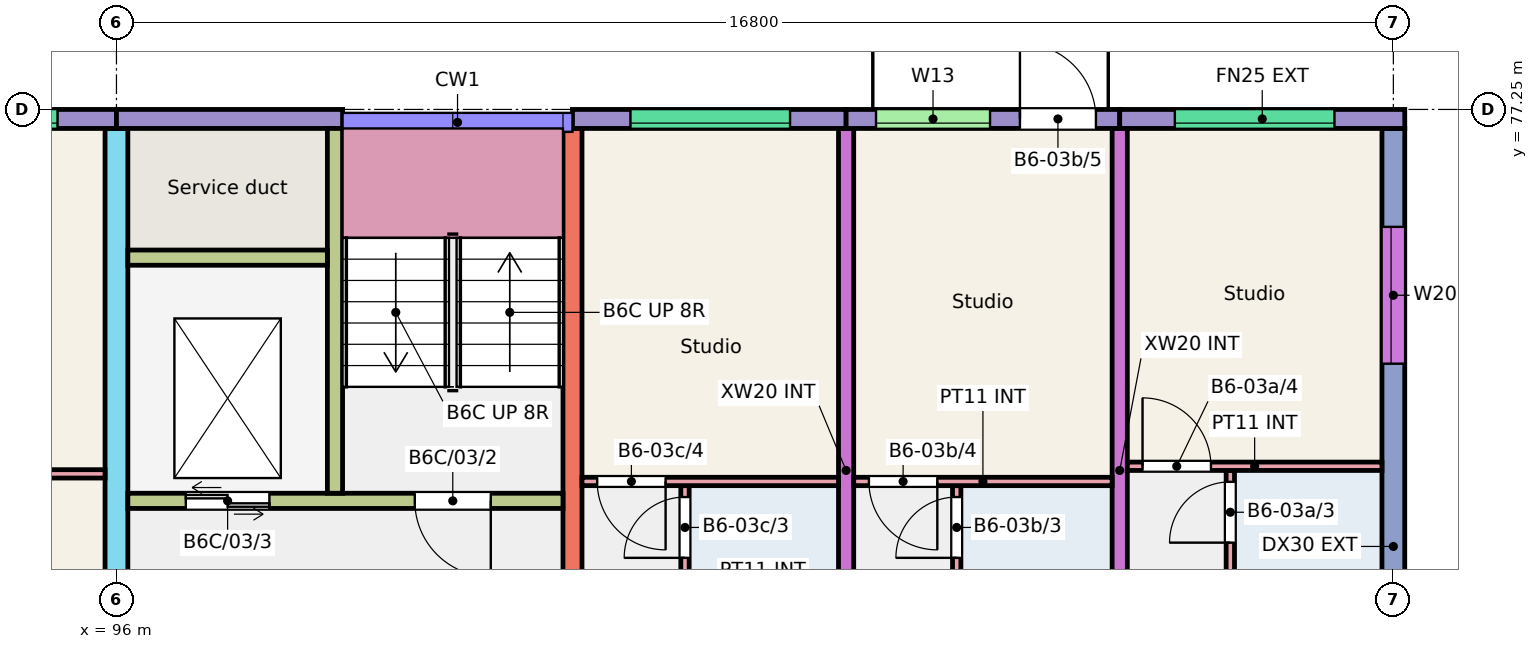
"""IFC4 building model, lengths in metres.
Left out: names, types, materials, properties, quantities, classifications, styles, units other than length and angle.
Written with IfcOpenShell. Run it as: python <this file> out.ifc"""

import sys

from ifc_helpers import new_model, si_unit, direction, frame, frame_2d, origin, place, context, subcontext, project, spatial, rectangle, extrude, element, fill, save


model = new_model("IFC4")
c1 = context("Model", 3, precision=1e-05, world=origin(), true_north=direction((0.0, 1.0)))
c2 = subcontext(c1, "Body", "Model", "MODEL_VIEW")
j1 = project(units=[si_unit("LENGTHUNIT", "METRE"), si_unit("PLANEANGLEUNIT", "RADIAN")], contexts=[c1])
p1 = place(None, origin())
s1 = spatial("IfcSite", under=j1, at=p1, CompositionType="ELEMENT")
p2 = place(p1, origin())
s2 = spatial("IfcBuilding", under=s1, at=p2, CompositionType="ELEMENT")
p3 = place(p2, frame((0.0, 0.0, 9.0)))
s3 = spatial("IfcBuildingStorey", under=s2, at=p3, CompositionType="ELEMENT", Elevation=9.0)
p4 = place(p3, frame((96.0, 66.0, 0.0), z_axis=(0.0, 0.0, 1.0), x_axis=(0.0, 1.0, 0.0)))
e1 = element("IfcWall", 1, at=p4, inside=s3, PredefinedType="SHEAR", context=c2, shape_type="SweptSolid", body=[
    extrude(rectangle(XDim=11.0, YDim=0.3, at=frame_2d((5.5, 0.0))), origin(), (0.0, 0.0, 1.0), 3.0),
])
p5 = place(p4, frame((0.3, 0.0, 0.0)))
e2 = element("IfcOpeningElement", 2, at=p5, cuts=e1, PredefinedType="OPENING", context=c2, shape_type="SweptSolid", body=[
    extrude(rectangle(XDim=1.2, YDim=2.1, at=frame_2d((0.6, 1.05))), frame((0.0, 0.16, 0.0), z_axis=(0.0, -1.0, 0.0), x_axis=(1.0, 0.0, 0.0)), (0.0, 0.0, 1.0), 0.32),
])
p6 = place(p3, frame((102.0, 68.0, 0.0), z_axis=(0.0, 0.0, 1.0), x_axis=(0.0, 1.0, 0.0)))
e3 = element("IfcWall", 3, at=p6, inside=s3, PredefinedType="SHEAR", context=c2, shape_type="SweptSolid", body=[
    extrude(rectangle(XDim=9.0, YDim=0.25, at=frame_2d((4.5, 0.0))), origin(), (0.0, 0.0, 1.0), 3.0),
])
for number, where, z_axis, x_axis in (
    (4, (105.6, 68.0, 0.0), (0.0, 0.0, 1.0), (0.0, 1.0, 0.0)),
    (5, (109.2, 68.0, 0.0), (0.0, 0.0, 1.0), (0.0, 1.0, 0.0)),
):
    element("IfcWall", number, at=place(p3, frame(where, z_axis=z_axis, x_axis=x_axis)), inside=s3, PredefinedType="SHEAR", context=c2, shape_type="SweptSolid", body=[
        extrude(rectangle(XDim=9.0, YDim=0.2, at=frame_2d((4.5, 0.0))), origin(), (0.0, 0.0, 1.0), 3.0),
    ])
p7 = place(p3, frame((112.8, 66.0, 0.0), z_axis=(0.0, 0.0, 1.0), x_axis=(0.0, 1.0, 0.0)))
e6 = element("IfcWall", 6, at=p7, inside=s3, PredefinedType="SHEAR", context=c2, shape_type="SweptSolid", body=[
    extrude(rectangle(XDim=11.0, YDim=0.3, at=frame_2d((5.5, 0.0))), origin(), (0.0, 0.0, 1.0), 3.0),
])
p8 = place(p7, frame((2.6, 0.0, 0.9)))
e7 = element("IfcOpeningElement", 7, at=p8, cuts=e6, PredefinedType="OPENING", context=c2, shape_type="SweptSolid", body=[
    extrude(rectangle(XDim=1.2, YDim=1.5, at=frame_2d((0.6, 0.75))), frame((0.0, 0.16, 0.0), z_axis=(0.0, -1.0, 0.0), x_axis=(1.0, 0.0, 0.0)), (0.0, 0.0, 1.0), 0.32),
])
p9 = place(p7, frame((7.905, 0.0, 0.9)))
e8 = element("IfcOpeningElement", 8, at=p9, cuts=e6, PredefinedType="OPENING", context=c2, shape_type="SweptSolid", body=[
    extrude(rectangle(XDim=1.8, YDim=1.5, at=frame_2d((0.9, 0.75))), frame((0.0, 0.16, 0.0), z_axis=(0.0, -1.0, 0.0), x_axis=(1.0, 0.0, 0.0)), (0.0, 0.0, 1.0), 0.32),
])
p10 = place(p3, frame((92.4, 77.125, 0.0), z_axis=(0.0, 0.0, 1.0), x_axis=(1.0, 0.0, 0.0)))
e9 = element("IfcWall", 9, at=p10, inside=s3, PredefinedType="SOLIDWALL", context=c2, shape_type="SweptSolid", body=[
    extrude(rectangle(XDim=3.6, YDim=0.25, at=frame_2d((1.8, 0.0))), origin(), (0.0, 0.0, 1.0), 3.0),
])
p11 = place(p10, frame((0.725, 0.0, 1.2)))
e10 = element("IfcOpeningElement", 10, at=p11, cuts=e9, PredefinedType="OPENING", context=c2, shape_type="SweptSolid", body=[
    extrude(rectangle(XDim=2.1, YDim=1.2, at=frame_2d((1.05, 0.6))), frame((0.0, 0.135, 0.0), z_axis=(0.0, -1.0, 0.0), x_axis=(1.0, 0.0, 0.0)), (0.0, 0.0, 1.0), 0.27),
])
p12 = place(p3, frame((96.0, 77.125, 0.0), z_axis=(0.0, 0.0, 1.0), x_axis=(1.0, 0.0, 0.0)))
e11 = element("IfcWall", 11, at=p12, inside=s3, PredefinedType="SOLIDWALL", context=c2, shape_type="SweptSolid", body=[
    extrude(rectangle(XDim=2.975, YDim=0.25, at=frame_2d((1.488, 0.0))), origin(), (0.0, 0.0, 1.0), 3.0),
])
p13 = place(p3, frame((96.15, 72.1, 0.0), z_axis=(0.0, 0.0, 1.0), x_axis=(1.0, 0.0, 0.0)))
e12 = element("IfcWall", 12, at=p13, inside=s3, PredefinedType="SHEAR", context=c2, shape_type="SweptSolid", body=[
    extrude(rectangle(XDim=5.725, YDim=0.2, at=frame_2d((2.863, 0.0))), origin(), (0.0, 0.0, 1.0), 3.0),
])
p14 = place(p13, frame((3.775, 0.0, 0.0)))
e13 = element("IfcOpeningElement", 13, at=p14, cuts=e12, PredefinedType="OPENING", context=c2, shape_type="SweptSolid", body=[
    extrude(rectangle(XDim=1.0, YDim=2.1, at=frame_2d((0.5, 1.05))), frame((0.0, 0.11, 0.0), z_axis=(0.0, -1.0, 0.0), x_axis=(1.0, 0.0, 0.0)), (0.0, 0.0, 1.0), 0.22),
])
p15 = place(p13, frame((0.762, 0.0, 0.0)))
e14 = element("IfcOpeningElement", 14, at=p15, cuts=e12, PredefinedType="OPENING", context=c2, shape_type="SweptSolid", body=[
    extrude(rectangle(XDim=1.1, YDim=2.1, at=frame_2d((0.55, 1.05))), frame((0.0, 0.11, 0.0), z_axis=(0.0, -1.0, 0.0), x_axis=(1.0, 0.0, 0.0)), (0.0, 0.0, 1.0), 0.22),
])
p16 = place(p3, frame((98.875, 72.2, 0.0), z_axis=(0.0, 0.0, 1.0), x_axis=(0.0, 1.0, 0.0)))
e15 = element("IfcWall", 15, at=p16, inside=s3, PredefinedType="SHEAR", context=c2, shape_type="SweptSolid", body=[
    extrude(rectangle(XDim=4.8, YDim=0.2, at=frame_2d((2.4, 0.0))), origin(), (0.0, 0.0, 1.0), 3.0),
])
p17 = place(p3, frame((96.15, 75.3, 0.0), z_axis=(0.0, 0.0, 1.0), x_axis=(1.0, 0.0, 0.0)))
e16 = element("IfcWall", 16, at=p17, inside=s3, PredefinedType="SHEAR", context=c2, shape_type="SweptSolid", body=[
    extrude(rectangle(XDim=2.625, YDim=0.2, at=frame_2d((1.312, 0.0))), origin(), (0.0, 0.0, 1.0), 3.0),
])
p18 = place(p3, frame((102.0, 77.125, 0.0), z_axis=(0.0, 0.0, 1.0), x_axis=(1.0, 0.0, 0.0)))
e17 = element("IfcWall", 17, at=p18, inside=s3, PredefinedType="SOLIDWALL", context=c2, shape_type="SweptSolid", body=[
    extrude(rectangle(XDim=3.6, YDim=0.25, at=frame_2d((1.8, 0.0))), origin(), (0.0, 0.0, 1.0), 3.0),
])
p19 = place(p18, frame((0.762, 0.0, 1.2)))
e18 = element("IfcOpeningElement", 18, at=p19, cuts=e17, PredefinedType="OPENING", context=c2, shape_type="SweptSolid", body=[
    extrude(rectangle(XDim=2.1, YDim=1.2, at=frame_2d((1.05, 0.6))), frame((0.0, 0.135, 0.0), z_axis=(0.0, -1.0, 0.0), x_axis=(1.0, 0.0, 0.0)), (0.0, 0.0, 1.0), 0.27),
])
p20 = place(p3, frame((105.6, 77.125, 0.0), z_axis=(0.0, 0.0, 1.0), x_axis=(1.0, 0.0, 0.0)))
e19 = element("IfcWall", 19, at=p20, inside=s3, PredefinedType="SOLIDWALL", context=c2, shape_type="SweptSolid", body=[
    extrude(rectangle(XDim=3.6, YDim=0.25, at=frame_2d((1.8, 0.0))), origin(), (0.0, 0.0, 1.0), 3.0),
])
p21 = place(p20, frame((0.394, 0.0, 1.2)))
e20 = element("IfcOpeningElement", 20, at=p21, cuts=e19, PredefinedType="OPENING", context=c2, shape_type="SweptSolid", body=[
    extrude(rectangle(XDim=1.5, YDim=1.2, at=frame_2d((0.75, 0.6))), frame((0.0, 0.135, 0.0), z_axis=(0.0, -1.0, 0.0), x_axis=(1.0, 0.0, 0.0)), (0.0, 0.0, 1.0), 0.27),
])
p22 = place(p20, frame((2.287, 0.0, 0.0)))
e21 = element("IfcOpeningElement", 21, at=p22, cuts=e19, PredefinedType="OPENING", context=c2, shape_type="SweptSolid", body=[
    extrude(rectangle(XDim=1.0, YDim=2.1, at=frame_2d((0.5, 1.05))), frame((0.0, 0.135, 0.0), z_axis=(0.0, -1.0, 0.0), x_axis=(1.0, 0.0, 0.0)), (0.0, 0.0, 1.0), 0.27),
])
p23 = place(p3, frame((109.2, 77.125, 0.0), z_axis=(0.0, 0.0, 1.0), x_axis=(1.0, 0.0, 0.0)))
e22 = element("IfcWall", 22, at=p23, inside=s3, PredefinedType="SOLIDWALL", context=c2, shape_type="SweptSolid", body=[
    extrude(rectangle(XDim=3.75, YDim=0.25, at=frame_2d((1.875, 0.0))), origin(), (0.0, 0.0, 1.0), 3.0),
])
p24 = place(p23, frame((0.725, 0.0, 1.2)))
e23 = element("IfcOpeningElement", 23, at=p24, cuts=e22, PredefinedType="OPENING", context=c2, shape_type="SweptSolid", body=[
    extrude(rectangle(XDim=2.1, YDim=1.2, at=frame_2d((1.05, 0.6))), frame((0.0, 0.135, 0.0), z_axis=(0.0, -1.0, 0.0), x_axis=(1.0, 0.0, 0.0)), (0.0, 0.0, 1.0), 0.27),
])
p25 = place(p3, frame((92.5, 72.455, 0.0), z_axis=(0.0, 0.0, 1.0), x_axis=(1.0, 0.0, 0.0)))
e24 = element("IfcWall", 24, at=p25, inside=s3, PredefinedType="PARTITIONING", context=c2, shape_type="SweptSolid", body=[
    extrude(rectangle(XDim=3.35, YDim=0.11, at=frame_2d((1.675, 0.0))), origin(), (0.0, 0.0, 1.0), 2.8),
])
p26 = place(p3, frame((110.655, 68.0, 0.0), z_axis=(0.0, 0.0, 1.0), x_axis=(0.0, 1.0, 0.0)))
e25 = element("IfcWall", 25, at=p26, inside=s3, PredefinedType="PARTITIONING", context=c2, shape_type="SweptSolid", body=[
    extrude(rectangle(XDim=4.5, YDim=0.11, at=frame_2d((2.25, 0.0))), origin(), (0.0, 0.0, 1.0), 2.8),
])
p27 = place(p26, frame((0.2, 0.0, 0.0)))
e26 = element("IfcOpeningElement", 26, at=p27, cuts=e25, PredefinedType="OPENING", context=c2, shape_type="SweptSolid", body=[
    extrude(rectangle(XDim=0.8, YDim=2.1, at=frame_2d((0.4, 1.05))), frame((0.0, 0.065, 0.0), z_axis=(0.0, -1.0, 0.0), x_axis=(1.0, 0.0, 0.0)), (0.0, 0.0, 1.0), 0.13),
])
p28 = place(p26, frame((3.55, 0.0, 0.0)))
e27 = element("IfcOpeningElement", 27, at=p28, cuts=e25, PredefinedType="OPENING", context=c2, shape_type="SweptSolid", body=[
    extrude(rectangle(XDim=0.8, YDim=2.1, at=frame_2d((0.4, 1.05))), frame((0.0, 0.065, 0.0), z_axis=(0.0, -1.0, 0.0), x_axis=(1.0, 0.0, 0.0)), (0.0, 0.0, 1.0), 0.13),
])
p29 = place(p3, frame((109.3, 72.555, 0.0), z_axis=(0.0, 0.0, 1.0), x_axis=(1.0, 0.0, 0.0)))
e28 = element("IfcWall", 28, at=p29, inside=s3, PredefinedType="PARTITIONING", context=c2, shape_type="SweptSolid", body=[
    extrude(rectangle(XDim=3.35, YDim=0.11, at=frame_2d((1.675, 0.0))), origin(), (0.0, 0.0, 1.0), 2.8),
])
p30 = place(p29, frame((0.2, 0.0, 0.0)))
e29 = element("IfcOpeningElement", 29, at=p30, cuts=e28, PredefinedType="OPENING", context=c2, shape_type="SweptSolid", body=[
    extrude(rectangle(XDim=0.9, YDim=2.1, at=frame_2d((0.45, 1.05))), frame((0.0, 0.065, 0.0), z_axis=(0.0, -1.0, 0.0), x_axis=(1.0, 0.0, 0.0)), (0.0, 0.0, 1.0), 0.13),
])
p31 = place(p3, frame((107.055, 68.0, 0.0), z_axis=(0.0, 0.0, 1.0), x_axis=(0.0, 1.0, 0.0)))
e30 = element("IfcWall", 30, at=p31, inside=s3, PredefinedType="PARTITIONING", context=c2, shape_type="SweptSolid", body=[
    extrude(rectangle(XDim=4.3, YDim=0.11, at=frame_2d((2.15, 0.0))), origin(), (0.0, 0.0, 1.0), 2.8),
])
p32 = place(p31, frame((0.2, 0.0, 0.0)))
e31 = element("IfcOpeningElement", 31, at=p32, cuts=e30, PredefinedType="OPENING", context=c2, shape_type="SweptSolid", body=[
    extrude(rectangle(XDim=0.8, YDim=2.1, at=frame_2d((0.4, 1.05))), frame((0.0, 0.065, 0.0), z_axis=(0.0, -1.0, 0.0), x_axis=(1.0, 0.0, 0.0)), (0.0, 0.0, 1.0), 0.13),
])
p33 = place(p31, frame((3.35, 0.0, 0.0)))
e32 = element("IfcOpeningElement", 32, at=p33, cuts=e30, PredefinedType="OPENING", context=c2, shape_type="SweptSolid", body=[
    extrude(rectangle(XDim=0.8, YDim=2.1, at=frame_2d((0.4, 1.05))), frame((0.0, 0.065, 0.0), z_axis=(0.0, -1.0, 0.0), x_axis=(1.0, 0.0, 0.0)), (0.0, 0.0, 1.0), 0.13),
])
p34 = place(p3, frame((105.7, 72.355, 0.0), z_axis=(0.0, 0.0, 1.0), x_axis=(1.0, 0.0, 0.0)))
e33 = element("IfcWall", 33, at=p34, inside=s3, PredefinedType="PARTITIONING", context=c2, shape_type="SweptSolid", body=[
    extrude(rectangle(XDim=3.4, YDim=0.11, at=frame_2d((1.7, 0.0))), origin(), (0.0, 0.0, 1.0), 2.8),
])
p35 = place(p34, frame((0.2, 0.0, 0.0)))
e34 = element("IfcOpeningElement", 34, at=p35, cuts=e33, PredefinedType="OPENING", context=c2, shape_type="SweptSolid", body=[
    extrude(rectangle(XDim=0.9, YDim=2.1, at=frame_2d((0.45, 1.05))), frame((0.0, 0.065, 0.0), z_axis=(0.0, -1.0, 0.0), x_axis=(1.0, 0.0, 0.0)), (0.0, 0.0, 1.0), 0.13),
])
p36 = place(p3, frame((103.48, 68.0, 0.0), z_axis=(0.0, 0.0, 1.0), x_axis=(0.0, 1.0, 0.0)))
e35 = element("IfcWall", 35, at=p36, inside=s3, PredefinedType="PARTITIONING", context=c2, shape_type="SweptSolid", body=[
    extrude(rectangle(XDim=4.3, YDim=0.11, at=frame_2d((2.15, 0.0))), origin(), (0.0, 0.0, 1.0), 2.8),
])
p37 = place(p36, frame((0.2, 0.0, 0.0)))
e36 = element("IfcOpeningElement", 36, at=p37, cuts=e35, PredefinedType="OPENING", context=c2, shape_type="SweptSolid", body=[
    extrude(rectangle(XDim=0.8, YDim=2.1, at=frame_2d((0.4, 1.05))), frame((0.0, 0.065, 0.0), z_axis=(0.0, -1.0, 0.0), x_axis=(1.0, 0.0, 0.0)), (0.0, 0.0, 1.0), 0.13),
])
p38 = place(p36, frame((3.35, 0.0, 0.0)))
e37 = element("IfcOpeningElement", 37, at=p38, cuts=e35, PredefinedType="OPENING", context=c2, shape_type="SweptSolid", body=[
    extrude(rectangle(XDim=0.8, YDim=2.1, at=frame_2d((0.4, 1.05))), frame((0.0, 0.065, 0.0), z_axis=(0.0, -1.0, 0.0), x_axis=(1.0, 0.0, 0.0)), (0.0, 0.0, 1.0), 0.13),
])
p39 = place(p3, frame((102.125, 72.355, 0.0), z_axis=(0.0, 0.0, 1.0), x_axis=(1.0, 0.0, 0.0)))
e38 = element("IfcWall", 38, at=p39, inside=s3, PredefinedType="PARTITIONING", context=c2, shape_type="SweptSolid", body=[
    extrude(rectangle(XDim=3.375, YDim=0.11, at=frame_2d((1.688, 0.0))), origin(), (0.0, 0.0, 1.0), 2.8),
])
p40 = place(p39, frame((0.2, 0.0, 0.0)))
e39 = element("IfcOpeningElement", 39, at=p40, cuts=e38, PredefinedType="OPENING", context=c2, shape_type="SweptSolid", body=[
    extrude(rectangle(XDim=0.9, YDim=2.1, at=frame_2d((0.45, 1.05))), frame((0.0, 0.065, 0.0), z_axis=(0.0, -1.0, 0.0), x_axis=(1.0, 0.0, 0.0)), (0.0, 0.0, 1.0), 0.13),
])
p41 = place(p11, origin())
e40 = element("IfcWindow", 40, at=p41, inside=s3, PartitioningType="SINGLE_PANEL", PredefinedType="WINDOW", context=c2, shape_type="SweptSolid", body=[
    extrude(rectangle(XDim=2.1, YDim=1.2, at=frame_2d((1.05, 0.6))), frame((0.0, -0.025, 0.0), z_axis=(0.0, -1.0, 0.0), x_axis=(1.0, 0.0, 0.0)), (0.0, 0.0, 1.0), 0.06),
])
fill(e10, e40)
p42 = place(p24, origin())
e41 = element("IfcWindow", 41, at=p42, inside=s3, PartitioningType="SINGLE_PANEL", PredefinedType="WINDOW", context=c2, shape_type="SweptSolid", body=[
    extrude(rectangle(XDim=2.1, YDim=1.2, at=frame_2d((1.05, 0.6))), frame((0.0, -0.025, 0.0), z_axis=(0.0, -1.0, 0.0), x_axis=(1.0, 0.0, 0.0)), (0.0, 0.0, 1.0), 0.06),
])
fill(e23, e41)
p43 = place(p9, origin())
e42 = element("IfcWindow", 42, at=p43, inside=s3, PartitioningType="SINGLE_PANEL", PredefinedType="WINDOW", context=c2, shape_type="SweptSolid", body=[
    extrude(rectangle(XDim=1.8, YDim=1.5, at=frame_2d((0.9, 0.75))), frame((0.0, 0.06, 0.0), z_axis=(0.0, -1.0, 0.0), x_axis=(1.0, 0.0, 0.0)), (0.0, 0.0, 1.0), 0.06),
])
fill(e8, e42)
p44 = place(p21, origin())
e43 = element("IfcWindow", 43, at=p44, inside=s3, PartitioningType="SINGLE_PANEL", PredefinedType="WINDOW", context=c2, shape_type="SweptSolid", body=[
    extrude(rectangle(XDim=1.5, YDim=1.2, at=frame_2d((0.75, 0.6))), frame((0.0, -0.025, 0.0), z_axis=(0.0, -1.0, 0.0), x_axis=(1.0, 0.0, 0.0)), (0.0, 0.0, 1.0), 0.06),
])
fill(e20, e43)
p45 = place(p19, origin())
e44 = element("IfcWindow", 44, at=p45, inside=s3, PartitioningType="SINGLE_PANEL", PredefinedType="WINDOW", context=c2, shape_type="SweptSolid", body=[
    extrude(rectangle(XDim=2.1, YDim=1.2, at=frame_2d((1.05, 0.6))), frame((0.0, -0.025, 0.0), z_axis=(0.0, -1.0, 0.0), x_axis=(1.0, 0.0, 0.0)), (0.0, 0.0, 1.0), 0.06),
])
fill(e18, e44)
p46 = place(p28, origin())
e45 = element("IfcDoor", 45, at=p46, inside=s3, OperationType="SINGLE_SWING_LEFT", PredefinedType="DOOR", context=c2, shape_type="SweptSolid", body=[
    extrude(rectangle(XDim=0.8, YDim=2.1, at=frame_2d((0.4, 1.05))), frame((0.0, 0.025, 0.0), z_axis=(0.0, -1.0, 0.0), x_axis=(1.0, 0.0, 0.0)), (0.0, 0.0, 1.0), 0.05),
])
fill(e27, e45)
p47 = place(p30, origin())
e46 = element("IfcDoor", 46, at=p47, inside=s3, OperationType="SINGLE_SWING_LEFT", PredefinedType="DOOR", context=c2, shape_type="SweptSolid", body=[
    extrude(rectangle(XDim=0.9, YDim=2.1, at=frame_2d((0.45, 1.05))), frame((0.0, 0.025, 0.0), z_axis=(0.0, -1.0, 0.0), x_axis=(1.0, 0.0, 0.0)), (0.0, 0.0, 1.0), 0.05),
])
fill(e29, e46)
p48 = place(p33, origin())
e47 = element("IfcDoor", 47, at=p48, inside=s3, OperationType="SINGLE_SWING_LEFT", PredefinedType="DOOR", context=c2, shape_type="SweptSolid", body=[
    extrude(rectangle(XDim=0.8, YDim=2.1, at=frame_2d((0.4, 1.05))), frame((0.0, 0.025, 0.0), z_axis=(0.0, -1.0, 0.0), x_axis=(1.0, 0.0, 0.0)), (0.0, 0.0, 1.0), 0.05),
])
fill(e32, e47)
p49 = place(p35, origin())
e48 = element("IfcDoor", 48, at=p49, inside=s3, OperationType="SINGLE_SWING_RIGHT", PredefinedType="DOOR", context=c2, shape_type="SweptSolid", body=[
    extrude(rectangle(XDim=0.9, YDim=2.1, at=frame_2d((0.45, 1.05))), frame((0.0, 0.025, 0.0), z_axis=(0.0, -1.0, 0.0), x_axis=(1.0, 0.0, 0.0)), (0.0, 0.0, 1.0), 0.05),
])
fill(e34, e48)
p50 = place(p22, origin())
e49 = element("IfcDoor", 49, at=p50, inside=s3, OperationType="SINGLE_SWING_LEFT", PredefinedType="DOOR", context=c2, shape_type="SweptSolid", body=[
    extrude(rectangle(XDim=1.0, YDim=2.1, at=frame_2d((0.5, 1.05))), frame((0.0, 0.025, 0.0), z_axis=(0.0, -1.0, 0.0), x_axis=(1.0, 0.0, 0.0)), (0.0, 0.0, 1.0), 0.05),
])
fill(e21, e49)
p51 = place(p38, origin())
e50 = element("IfcDoor", 50, at=p51, inside=s3, OperationType="SINGLE_SWING_LEFT", PredefinedType="DOOR", context=c2, shape_type="SweptSolid", body=[
    extrude(rectangle(XDim=0.8, YDim=2.1, at=frame_2d((0.4, 1.05))), frame((0.0, 0.025, 0.0), z_axis=(0.0, -1.0, 0.0), x_axis=(1.0, 0.0, 0.0)), (0.0, 0.0, 1.0), 0.05),
])
fill(e37, e50)
p52 = place(p40, origin())
e51 = element("IfcDoor", 51, at=p52, inside=s3, OperationType="SINGLE_SWING_RIGHT", PredefinedType="DOOR", context=c2, shape_type="SweptSolid", body=[
    extrude(rectangle(XDim=0.9, YDim=2.1, at=frame_2d((0.45, 1.05))), frame((0.0, 0.025, 0.0), z_axis=(0.0, -1.0, 0.0), x_axis=(1.0, 0.0, 0.0)), (0.0, 0.0, 1.0), 0.05),
])
fill(e39, e51)
p53 = place(p14, origin())
e52 = element("IfcDoor", 52, at=p53, inside=s3, OperationType="SINGLE_SWING_RIGHT", PredefinedType="DOOR", context=c2, shape_type="SweptSolid", body=[
    extrude(rectangle(XDim=1.0, YDim=2.1, at=frame_2d((0.5, 1.05))), frame((0.0, 0.025, 0.0), z_axis=(0.0, -1.0, 0.0), x_axis=(1.0, 0.0, 0.0)), (0.0, 0.0, 1.0), 0.05),
])
fill(e13, e52)
p54 = place(p15, origin())
e53 = element("IfcDoor", 53, at=p54, inside=s3, OperationType="DOUBLE_DOOR_SLIDING", PredefinedType="DOOR", context=c2, shape_type="SweptSolid", body=[
    extrude(rectangle(XDim=1.1, YDim=2.1, at=frame_2d((0.55, 1.05))), frame((0.0, 0.025, 0.0), z_axis=(0.0, -1.0, 0.0), x_axis=(1.0, 0.0, 0.0)), (0.0, 0.0, 1.0), 0.05),
])
fill(e14, e53)
save(model, sys.argv[1])
